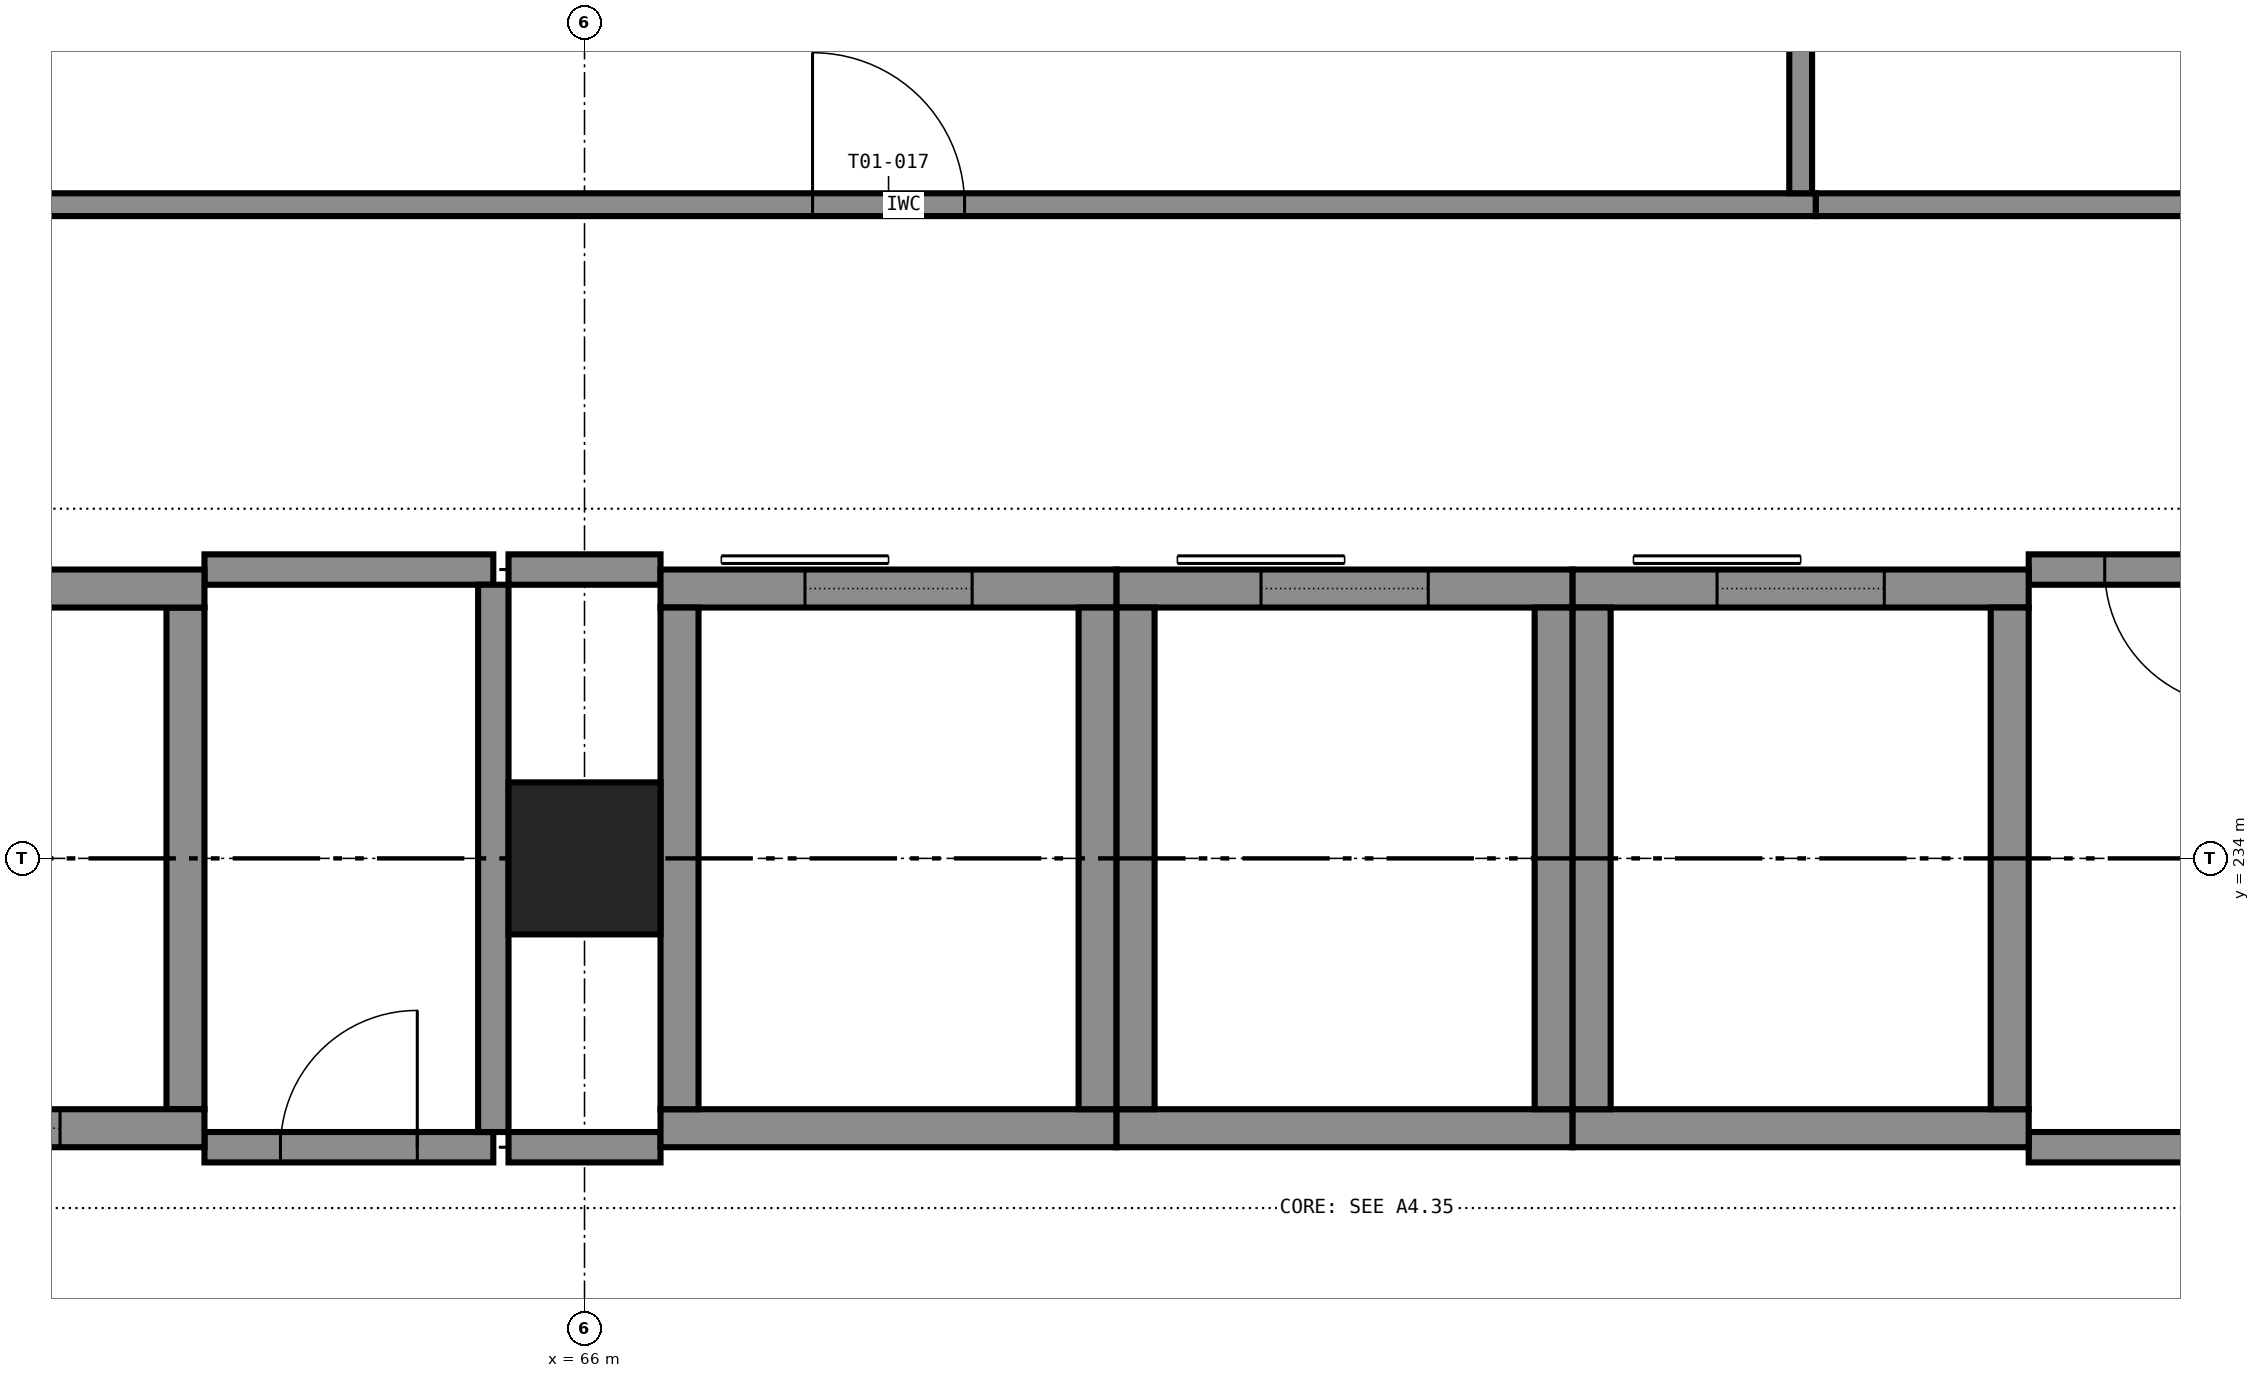
"""IFC4 building model, lengths in metres.
Left out: names, types, materials, properties, quantities, classifications, styles, units other than length and angle.
Written with IfcOpenShell. Run it as: python <this file> out.ifc"""

import sys

from ifc_helpers import new_model, si_unit, direction, frame, frame_2d, origin, origin_2d, place, context, subcontext, project, spatial, rectangle, extrude, element, fill, save


model = new_model("IFC4")
c1 = context("Model", 3, precision=1e-05, world=origin(), true_north=direction((0.0, 1.0)))
c2 = subcontext(c1, "Body", "Model", "MODEL_VIEW")
j1 = project(units=[si_unit("LENGTHUNIT", "METRE"), si_unit("PLANEANGLEUNIT", "RADIAN")], contexts=[c1])
p1 = place(None, origin())
s1 = spatial("IfcSite", under=j1, at=p1, CompositionType="ELEMENT")
p2 = place(p1, origin())
s2 = spatial("IfcBuilding", under=s1, at=p2, CompositionType="ELEMENT")
p3 = place(p2, frame((0.0, 0.0, 6.0)))
s3 = spatial("IfcBuildingStorey", under=s2, at=p3, CompositionType="ELEMENT", Elevation=6.0)
p4 = place(p3, frame((66.0, 234.0, 0.0), z_axis=(0.0, 0.0, 1.0), x_axis=(1.0, 0.0, 0.0)))
e1 = element("IfcColumn", 1, at=p4, inside=s3, PredefinedType="COLUMN", context=c2, shape_type="SweptSolid", body=[
    extrude(rectangle(XDim=1.0, YDim=1.0, at=origin_2d()), origin(), (0.0, 0.0, 1.0), 6.0),
])
p5 = place(p3, frame((60.5, 232.225, 0.0), z_axis=(0.0, 0.0, 1.0), x_axis=(1.0, 0.0, 0.0)))
e2 = element("IfcWall", 2, at=p5, inside=s3, PredefinedType="SHEAR", context=c2, shape_type="SweptSolid", body=[
    extrude(rectangle(XDim=3.0, YDim=0.25, at=frame_2d((1.5, 0.0))), origin(), (0.0, 0.0, 1.0), 6.0),
])
p6 = place(p5, frame((0.95, 0.0, 0.0)))
e3 = element("IfcOpeningElement", 3, at=p6, cuts=e2, PredefinedType="OPENING", context=c2, shape_type="SweptSolid", body=[
    extrude(rectangle(XDim=1.1, YDim=2.1, at=frame_2d((0.55, 1.05))), frame((0.0, 0.135, 0.0), z_axis=(0.0, -1.0, 0.0), x_axis=(1.0, 0.0, 0.0)), (0.0, 0.0, 1.0), 0.27),
])
p7 = place(p3, frame((60.5, 235.775, 0.0), z_axis=(0.0, 0.0, 1.0), x_axis=(1.0, 0.0, 0.0)))
e4 = element("IfcWall", 4, at=p7, inside=s3, PredefinedType="SHEAR", context=c2, shape_type="SweptSolid", body=[
    extrude(rectangle(XDim=3.0, YDim=0.25, at=frame_2d((1.5, 0.0))), origin(), (0.0, 0.0, 1.0), 6.0),
])
p8 = place(p3, frame((63.375, 232.35, 0.0), z_axis=(0.0, 0.0, 1.0), x_axis=(0.0, 1.0, 0.0)))
e5 = element("IfcWall", 5, at=p8, inside=s3, PredefinedType="SHEAR", context=c2, shape_type="SweptSolid", body=[
    extrude(rectangle(XDim=3.3, YDim=0.25, at=frame_2d((1.65, 0.0))), origin(), (0.0, 0.0, 1.0), 6.0),
])
p9 = place(p3, frame((66.5, 232.225, 0.0), z_axis=(0.0, 0.0, 1.0), x_axis=(1.0, 0.0, 0.0)))
e6 = element("IfcWall", 6, at=p9, inside=s3, PredefinedType="SHEAR", context=c2, shape_type="SweptSolid", body=[
    extrude(rectangle(XDim=3.0, YDim=0.25, at=frame_2d((1.5, 0.0))), origin(), (0.0, 0.0, 1.0), 6.0),
])
p10 = place(p3, frame((66.5, 235.775, 0.0), z_axis=(0.0, 0.0, 1.0), x_axis=(1.0, 0.0, 0.0)))
e7 = element("IfcWall", 7, at=p10, inside=s3, PredefinedType="SHEAR", context=c2, shape_type="SweptSolid", body=[
    extrude(rectangle(XDim=3.0, YDim=0.25, at=frame_2d((1.5, 0.0))), origin(), (0.0, 0.0, 1.0), 6.0),
])
p11 = place(p10, frame((0.95, 0.0, 0.0)))
e8 = element("IfcOpeningElement", 8, at=p11, cuts=e7, PredefinedType="OPENING", context=c2, shape_type="SweptSolid", body=[
    extrude(rectangle(XDim=1.1, YDim=2.1, at=frame_2d((0.55, 1.05))), frame((0.0, 0.135, 0.0), z_axis=(0.0, -1.0, 0.0), x_axis=(1.0, 0.0, 0.0)), (0.0, 0.0, 1.0), 0.27),
])
for number, where, z_axis, x_axis in (
    (9, (66.625, 232.35, 0.0), (0.0, 0.0, 1.0), (0.0, 1.0, 0.0)),
    (10, (69.375, 232.35, 0.0), (0.0, 0.0, 1.0), (0.0, 1.0, 0.0)),
):
    element("IfcWall", number, at=place(p3, frame(where, z_axis=z_axis, x_axis=x_axis)), inside=s3, PredefinedType="SHEAR", context=c2, shape_type="SweptSolid", body=[
        extrude(rectangle(XDim=3.3, YDim=0.25, at=frame_2d((1.65, 0.0))), origin(), (0.0, 0.0, 1.0), 6.0),
    ])
p12 = place(p3, frame((69.5, 232.225, 0.0), z_axis=(0.0, 0.0, 1.0), x_axis=(1.0, 0.0, 0.0)))
e11 = element("IfcWall", 11, at=p12, inside=s3, PredefinedType="SHEAR", context=c2, shape_type="SweptSolid", body=[
    extrude(rectangle(XDim=3.0, YDim=0.25, at=frame_2d((1.5, 0.0))), origin(), (0.0, 0.0, 1.0), 6.0),
])
p13 = place(p3, frame((69.5, 235.775, 0.0), z_axis=(0.0, 0.0, 1.0), x_axis=(1.0, 0.0, 0.0)))
e12 = element("IfcWall", 12, at=p13, inside=s3, PredefinedType="SHEAR", context=c2, shape_type="SweptSolid", body=[
    extrude(rectangle(XDim=3.0, YDim=0.25, at=frame_2d((1.5, 0.0))), origin(), (0.0, 0.0, 1.0), 6.0),
])
p14 = place(p13, frame((0.95, 0.0, 0.0)))
e13 = element("IfcOpeningElement", 13, at=p14, cuts=e12, PredefinedType="OPENING", context=c2, shape_type="SweptSolid", body=[
    extrude(rectangle(XDim=1.1, YDim=2.1, at=frame_2d((0.55, 1.05))), frame((0.0, 0.135, 0.0), z_axis=(0.0, -1.0, 0.0), x_axis=(1.0, 0.0, 0.0)), (0.0, 0.0, 1.0), 0.27),
])
for number, where, z_axis, x_axis in (
    (14, (69.625, 232.35, 0.0), (0.0, 0.0, 1.0), (0.0, 1.0, 0.0)),
    (15, (72.375, 232.35, 0.0), (0.0, 0.0, 1.0), (0.0, 1.0, 0.0)),
):
    element("IfcWall", number, at=place(p3, frame(where, z_axis=z_axis, x_axis=x_axis)), inside=s3, PredefinedType="SHEAR", context=c2, shape_type="SweptSolid", body=[
        extrude(rectangle(XDim=3.3, YDim=0.25, at=frame_2d((1.65, 0.0))), origin(), (0.0, 0.0, 1.0), 6.0),
    ])
p15 = place(p3, frame((72.5, 232.225, 0.0), z_axis=(0.0, 0.0, 1.0), x_axis=(1.0, 0.0, 0.0)))
e16 = element("IfcWall", 16, at=p15, inside=s3, PredefinedType="SHEAR", context=c2, shape_type="SweptSolid", body=[
    extrude(rectangle(XDim=3.0, YDim=0.25, at=frame_2d((1.5, 0.0))), origin(), (0.0, 0.0, 1.0), 6.0),
])
p16 = place(p3, frame((72.5, 235.775, 0.0), z_axis=(0.0, 0.0, 1.0), x_axis=(1.0, 0.0, 0.0)))
e17 = element("IfcWall", 17, at=p16, inside=s3, PredefinedType="SHEAR", context=c2, shape_type="SweptSolid", body=[
    extrude(rectangle(XDim=3.0, YDim=0.25, at=frame_2d((1.5, 0.0))), origin(), (0.0, 0.0, 1.0), 6.0),
])
p17 = place(p16, frame((0.95, 0.0, 0.0)))
e18 = element("IfcOpeningElement", 18, at=p17, cuts=e17, PredefinedType="OPENING", context=c2, shape_type="SweptSolid", body=[
    extrude(rectangle(XDim=1.1, YDim=2.1, at=frame_2d((0.55, 1.05))), frame((0.0, 0.135, 0.0), z_axis=(0.0, -1.0, 0.0), x_axis=(1.0, 0.0, 0.0)), (0.0, 0.0, 1.0), 0.27),
])
for number, where, z_axis, x_axis in (
    (19, (72.625, 232.35, 0.0), (0.0, 0.0, 1.0), (0.0, 1.0, 0.0)),
    (20, (75.375, 232.35, 0.0), (0.0, 0.0, 1.0), (0.0, 1.0, 0.0)),
):
    element("IfcWall", number, at=place(p3, frame(where, z_axis=z_axis, x_axis=x_axis)), inside=s3, PredefinedType="SHEAR", context=c2, shape_type="SweptSolid", body=[
        extrude(rectangle(XDim=3.3, YDim=0.25, at=frame_2d((1.65, 0.0))), origin(), (0.0, 0.0, 1.0), 6.0),
    ])
p18 = place(p3, frame((63.5, 232.1, 0.0), z_axis=(0.0, 0.0, 1.0), x_axis=(1.0, 0.0, 0.0)))
e21 = element("IfcWall", 21, at=p18, inside=s3, PredefinedType="PARTITIONING", context=c2, shape_type="SweptSolid", body=[
    extrude(rectangle(XDim=1.9, YDim=0.2, at=frame_2d((0.95, 0.0))), origin(), (0.0, 0.0, 1.0), 5.75),
])
p19 = place(p18, frame((0.5, 0.0, 0.0)))
e22 = element("IfcOpeningElement", 22, at=p19, cuts=e21, PredefinedType="OPENING", context=c2, shape_type="SweptSolid", body=[
    extrude(rectangle(XDim=0.9, YDim=2.1, at=frame_2d((0.45, 1.05))), frame((0.0, 0.11, 0.0), z_axis=(0.0, -1.0, 0.0), x_axis=(1.0, 0.0, 0.0)), (0.0, 0.0, 1.0), 0.22),
])
p20 = place(p3, frame((65.5, 232.1, 0.0), z_axis=(0.0, 0.0, 1.0), x_axis=(1.0, 0.0, 0.0)))
e23 = element("IfcWall", 23, at=p20, inside=s3, PredefinedType="PARTITIONING", context=c2, shape_type="SweptSolid", body=[
    extrude(rectangle(XDim=1.0, YDim=0.2, at=frame_2d((0.5, 0.0))), origin(), (0.0, 0.0, 1.0), 5.75),
])
for number, where, z_axis, x_axis in (
    (24, (75.5, 232.1, 0.0), (0.0, 0.0, 1.0), (1.0, 0.0, 0.0)),
    (25, (63.5, 235.9, 0.0), (0.0, 0.0, 1.0), (1.0, 0.0, 0.0)),
):
    element("IfcWall", number, at=place(p3, frame(where, z_axis=z_axis, x_axis=x_axis)), inside=s3, PredefinedType="PARTITIONING", context=c2, shape_type="SweptSolid", body=[
        extrude(rectangle(XDim=1.9, YDim=0.2, at=frame_2d((0.95, 0.0))), origin(), (0.0, 0.0, 1.0), 5.75),
    ])
p21 = place(p3, frame((65.5, 235.9, 0.0), z_axis=(0.0, 0.0, 1.0), x_axis=(1.0, 0.0, 0.0)))
e26 = element("IfcWall", 26, at=p21, inside=s3, PredefinedType="PARTITIONING", context=c2, shape_type="SweptSolid", body=[
    extrude(rectangle(XDim=1.0, YDim=0.2, at=frame_2d((0.5, 0.0))), origin(), (0.0, 0.0, 1.0), 5.75),
])
p22 = place(p3, frame((77.4, 235.9, 0.0), z_axis=(0.0, 0.0, 1.0), x_axis=(-1.0, 0.0, 0.0)))
e27 = element("IfcWall", 27, at=p22, inside=s3, PredefinedType="PARTITIONING", context=c2, shape_type="SweptSolid", body=[
    extrude(rectangle(XDim=1.9, YDim=0.2, at=frame_2d((0.95, 0.0))), origin(), (0.0, 0.0, 1.0), 5.75),
])
p23 = place(p22, frame((0.5, 0.0, 0.0)))
e28 = element("IfcOpeningElement", 28, at=p23, cuts=e27, PredefinedType="OPENING", context=c2, shape_type="SweptSolid", body=[
    extrude(rectangle(XDim=0.9, YDim=2.1, at=frame_2d((0.45, 1.05))), frame((0.0, 0.11, 0.0), z_axis=(0.0, -1.0, 0.0), x_axis=(1.0, 0.0, 0.0)), (0.0, 0.0, 1.0), 0.22),
])
p24 = place(p3, frame((65.4, 232.2, 0.0), z_axis=(0.0, 0.0, 1.0), x_axis=(0.0, 1.0, 0.0)))
e29 = element("IfcWall", 29, at=p24, inside=s3, PredefinedType="PARTITIONING", context=c2, shape_type="SweptSolid", body=[
    extrude(rectangle(XDim=3.6, YDim=0.2, at=frame_2d((1.8, 0.0))), origin(), (0.0, 0.0, 1.0), 5.75),
])
p25 = place(p3, frame((62.1, 238.3, 0.0), z_axis=(0.0, 0.0, 1.0), x_axis=(1.0, 0.0, 0.0)))
e30 = element("IfcWall", 30, at=p25, inside=s3, PredefinedType="PARTITIONING", context=c2, shape_type="SweptSolid", body=[
    extrude(rectangle(XDim=12.0, YDim=0.15, at=frame_2d((6.0, 0.0))), origin(), (0.0, 0.0, 1.0), 5.75),
])
p26 = place(p25, frame((5.4, 0.0, 0.0)))
e31 = element("IfcOpeningElement", 31, at=p26, cuts=e30, PredefinedType="OPENING", context=c2, shape_type="SweptSolid", body=[
    extrude(rectangle(XDim=1.0, YDim=2.1, at=frame_2d((0.5, 1.05))), frame((0.0, 0.085, 0.0), z_axis=(0.0, -1.0, 0.0), x_axis=(1.0, 0.0, 0.0)), (0.0, 0.0, 1.0), 0.17),
])
p27 = place(p3, frame((74.1, 238.3, 0.0), z_axis=(0.0, 0.0, 1.0), x_axis=(1.0, 0.0, 0.0)))
e32 = element("IfcWall", 32, at=p27, inside=s3, PredefinedType="PARTITIONING", context=c2, shape_type="SweptSolid", body=[
    extrude(rectangle(XDim=8.0, YDim=0.15, at=frame_2d((4.0, 0.0))), origin(), (0.0, 0.0, 1.0), 5.75),
])
p28 = place(p27, frame((3.4, 0.0, 0.0)))
e33 = element("IfcOpeningElement", 33, at=p28, cuts=e32, PredefinedType="OPENING", context=c2, shape_type="SweptSolid", body=[
    extrude(rectangle(XDim=1.0, YDim=2.1, at=frame_2d((0.5, 1.05))), frame((0.0, 0.085, 0.0), z_axis=(0.0, -1.0, 0.0), x_axis=(1.0, 0.0, 0.0)), (0.0, 0.0, 1.0), 0.17),
])
p29 = place(p3, frame((74.0, 245.8, 0.0), z_axis=(0.0, 0.0, 1.0), x_axis=(0.0, -1.0, 0.0)))
e34 = element("IfcWall", 34, at=p29, inside=s3, PredefinedType="PARTITIONING", context=c2, shape_type="SweptSolid", body=[
    extrude(rectangle(XDim=7.425, YDim=0.15, at=frame_2d((3.712, 0.0))), origin(), (0.0, 0.0, 1.0), 5.75),
])
p30 = place(p19, origin())
e35 = element("IfcDoor", 35, at=p30, inside=s3, OperationType="SINGLE_SWING_RIGHT", PredefinedType="DOOR", context=c2, shape_type="SweptSolid", body=[
    extrude(rectangle(XDim=0.9, YDim=2.1, at=frame_2d((0.45, 1.05))), frame((0.0, 0.025, 0.0), z_axis=(0.0, -1.0, 0.0), x_axis=(1.0, 0.0, 0.0)), (0.0, 0.0, 1.0), 0.05),
])
fill(e22, e35)
p31 = place(p23, origin())
e36 = element("IfcDoor", 36, at=p31, inside=s3, OperationType="SINGLE_SWING_LEFT", PredefinedType="DOOR", context=c2, shape_type="SweptSolid", body=[
    extrude(rectangle(XDim=0.9, YDim=2.1, at=frame_2d((0.45, 1.05))), frame((0.0, 0.025, 0.0), z_axis=(0.0, -1.0, 0.0), x_axis=(1.0, 0.0, 0.0)), (0.0, 0.0, 1.0), 0.05),
])
fill(e28, e36)
p32 = place(p26, origin())
e37 = element("IfcDoor", 37, at=p32, inside=s3, OperationType="SINGLE_SWING_LEFT", PredefinedType="DOOR", context=c2, shape_type="SweptSolid", body=[
    extrude(rectangle(XDim=1.0, YDim=2.1, at=frame_2d((0.5, 1.05))), frame((0.0, 0.025, 0.0), z_axis=(0.0, -1.0, 0.0), x_axis=(1.0, 0.0, 0.0)), (0.0, 0.0, 1.0), 0.05),
])
fill(e31, e37)
p33 = place(p6, origin())
e38 = element("IfcDoor", 38, at=p33, inside=s3, OperationType="SLIDING_TO_LEFT", PredefinedType="DOOR", context=c2, shape_type="SweptSolid", body=[
    extrude(rectangle(XDim=1.1, YDim=2.1, at=frame_2d((0.55, 1.05))), frame((0.0, 0.025, 0.0), z_axis=(0.0, -1.0, 0.0), x_axis=(1.0, 0.0, 0.0)), (0.0, 0.0, 1.0), 0.05),
])
fill(e3, e38)
p34 = place(p11, origin())
e39 = element("IfcDoor", 39, at=p34, inside=s3, OperationType="SLIDING_TO_LEFT", PredefinedType="DOOR", context=c2, shape_type="SweptSolid", body=[
    extrude(rectangle(XDim=1.1, YDim=2.1, at=frame_2d((0.55, 1.05))), frame((0.0, 0.025, 0.0), z_axis=(0.0, -1.0, 0.0), x_axis=(1.0, 0.0, 0.0)), (0.0, 0.0, 1.0), 0.05),
])
fill(e8, e39)
p35 = place(p14, origin())
e40 = element("IfcDoor", 40, at=p35, inside=s3, OperationType="SLIDING_TO_LEFT", PredefinedType="DOOR", context=c2, shape_type="SweptSolid", body=[
    extrude(rectangle(XDim=1.1, YDim=2.1, at=frame_2d((0.55, 1.05))), frame((0.0, 0.025, 0.0), z_axis=(0.0, -1.0, 0.0), x_axis=(1.0, 0.0, 0.0)), (0.0, 0.0, 1.0), 0.05),
])
fill(e13, e40)
p36 = place(p17, origin())
e41 = element("IfcDoor", 41, at=p36, inside=s3, OperationType="SLIDING_TO_LEFT", PredefinedType="DOOR", context=c2, shape_type="SweptSolid", body=[
    extrude(rectangle(XDim=1.1, YDim=2.1, at=frame_2d((0.55, 1.05))), frame((0.0, 0.025, 0.0), z_axis=(0.0, -1.0, 0.0), x_axis=(1.0, 0.0, 0.0)), (0.0, 0.0, 1.0), 0.05),
])
fill(e18, e41)
save(model, sys.argv[1])
